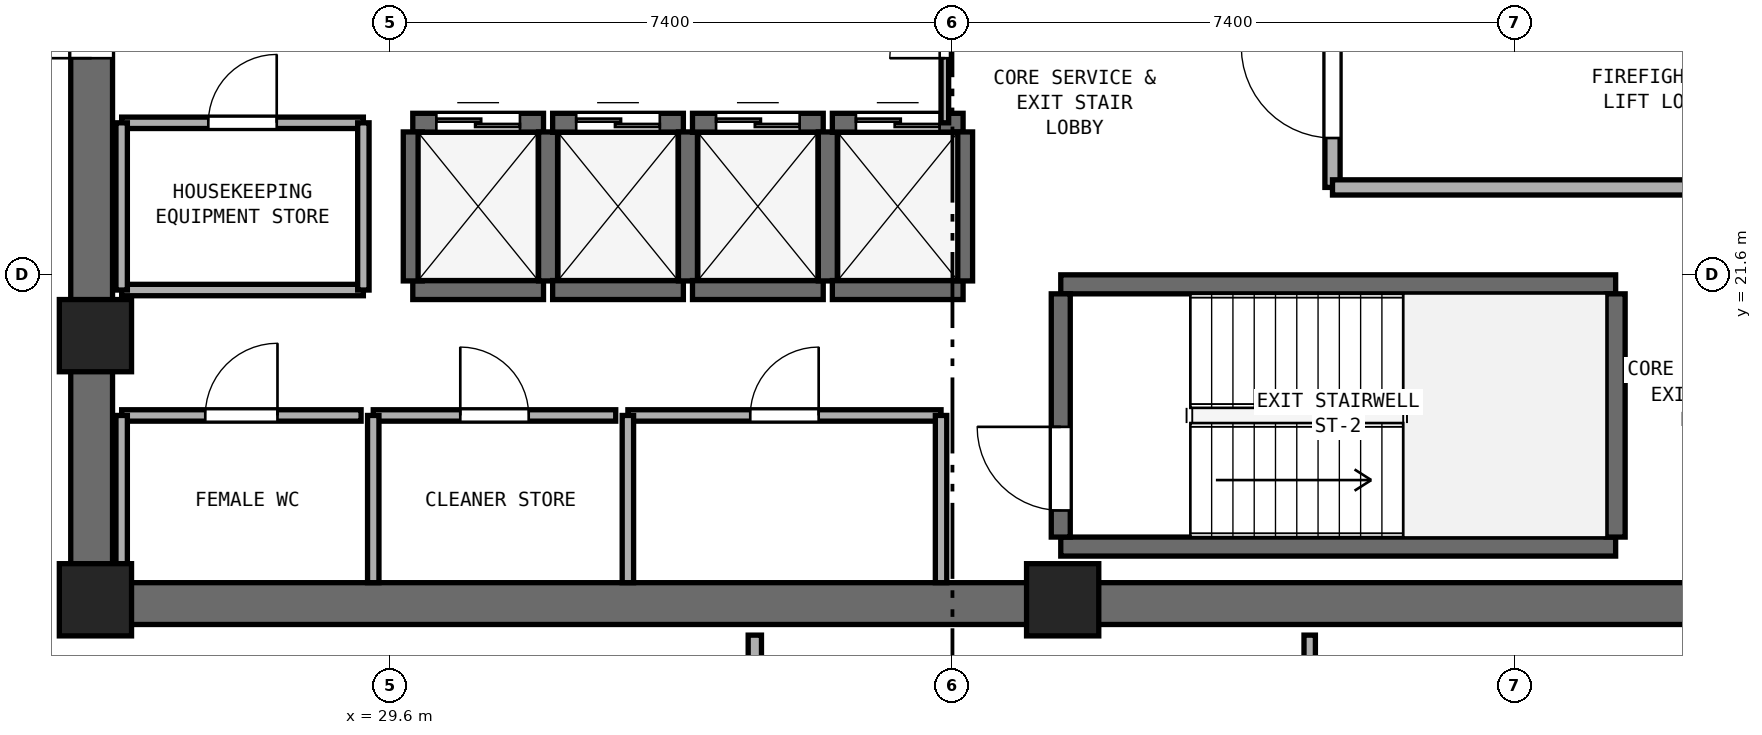
"""IFC4 building model, lengths in metres.
Left out: names, types, materials, properties, quantities, classifications, styles, units other than length and angle.
Written with IfcOpenShell. Run it as: python <this file> out.ifc"""

import sys

from ifc_helpers import new_model, si_unit, direction, frame, frame_2d, origin, origin_2d, place, context, subcontext, project, spatial, rectangle, extrude, element, fill, save


model = new_model("IFC4")
c1 = context("Model", 3, precision=1e-05, world=origin(), true_north=direction((0.0, 1.0)))
c2 = subcontext(c1, "Body", "Model", "MODEL_VIEW")
j1 = project(units=[si_unit("LENGTHUNIT", "METRE"), si_unit("PLANEANGLEUNIT", "RADIAN")], contexts=[c1])
p1 = place(None, origin())
s1 = spatial("IfcSite", under=j1, at=p1, CompositionType="ELEMENT")
p2 = place(p1, origin())
s2 = spatial("IfcBuilding", under=s1, at=p2, CompositionType="ELEMENT")
p3 = place(p2, frame((0.0, 0.0, 147.8)))
s3 = spatial("IfcBuildingStorey", under=s2, at=p3, CompositionType="ELEMENT", Elevation=147.8)
p4 = place(p3, frame((25.4, 17.275, 0.0), z_axis=(0.0, 0.0, 1.0), x_axis=(1.0, 0.0, 0.0)))
e1 = element("IfcWall", 1, at=p4, inside=s3, PredefinedType="SHEAR", context=c2, shape_type="SweptSolid", body=[
    extrude(rectangle(XDim=23.2, YDim=0.55, at=frame_2d((11.6, 0.0))), origin(), (0.0, 0.0, 1.0), 3.54),
])
p5 = place(p3, frame((25.675, 17.55, 0.0), z_axis=(0.0, 0.0, 1.0), x_axis=(0.0, 1.0, 0.0)))
e2 = element("IfcWall", 2, at=p5, inside=s3, PredefinedType="SHEAR", context=c2, shape_type="SweptSolid", body=[
    extrude(rectangle(XDim=15.3, YDim=0.55, at=frame_2d((7.65, 0.0))), origin(), (0.0, 0.0, 1.0), 3.54),
])
p6 = place(p5, frame((6.9, 0.0, 0.0)))
e3 = element("IfcOpeningElement", 3, at=p6, cuts=e2, PredefinedType="OPENING", context=c2, shape_type="SweptSolid", body=[
    extrude(rectangle(XDim=1.5, YDim=2.15, at=frame_2d((0.75, 1.075))), frame((0.0, 0.285, 0.0), z_axis=(0.0, -1.0, 0.0), x_axis=(1.0, 0.0, 0.0)), (0.0, 0.0, 1.0), 0.57),
])
for number, where, z_axis, x_axis in (
    (4, (25.725, 17.325, 0.0), (0.0, 0.0, 1.0), (1.0, 0.0, 0.0)),
    (5, (38.45, 17.325, 0.0), (0.0, 0.0, 1.0), (1.0, 0.0, 0.0)),
    (6, (25.725, 20.8, 0.0), (0.0, 0.0, 1.0), (1.0, 0.0, 0.0)),
):
    element("IfcColumn", number, at=place(p3, frame(where, z_axis=z_axis, x_axis=x_axis)), inside=s3, PredefinedType="PILASTER", context=c2, shape_type="SweptSolid", body=[
        extrude(rectangle(XDim=0.95, YDim=0.95, at=origin_2d()), origin(), (0.0, 0.0, 1.0), 3.8),
    ])
for number, where, z_axis, x_axis in (
    (7, (38.425, 18.025, 0.0), (0.0, 0.0, 1.0), (1.0, 0.0, 0.0)),
    (8, (38.425, 21.475, 0.0), (0.0, 0.0, 1.0), (1.0, 0.0, 0.0)),
):
    element("IfcWall", number, at=place(p3, frame(where, z_axis=z_axis, x_axis=x_axis)), inside=s3, PredefinedType="SHEAR", context=c2, shape_type="SweptSolid", body=[
        extrude(rectangle(XDim=7.3, YDim=0.25, at=frame_2d((3.65, 0.0))), origin(), (0.0, 0.0, 1.0), 3.54),
    ])
p7 = place(p3, frame((38.425, 18.15, 0.0), z_axis=(0.0, 0.0, 1.0), x_axis=(0.0, 1.0, 0.0)))
e9 = element("IfcWall", 9, at=p7, inside=s3, PredefinedType="SHEAR", context=c2, shape_type="SweptSolid", body=[
    extrude(rectangle(XDim=3.2, YDim=0.25, at=frame_2d((1.6, 0.0))), origin(), (0.0, 0.0, 1.0), 3.54),
])
p8 = place(p7, frame((0.35, 0.0, 0.0)))
e10 = element("IfcOpeningElement", 10, at=p8, cuts=e9, PredefinedType="OPENING", context=c2, shape_type="SweptSolid", body=[
    extrude(rectangle(XDim=1.1, YDim=2.15, at=frame_2d((0.55, 1.075))), frame((0.0, 0.135, 0.0), z_axis=(0.0, -1.0, 0.0), x_axis=(1.0, 0.0, 0.0)), (0.0, 0.0, 1.0), 0.27),
])
p9 = place(p3, frame((45.725, 18.15, 0.0), z_axis=(0.0, 0.0, 1.0), x_axis=(0.0, 1.0, 0.0)))
e11 = element("IfcWall", 11, at=p9, inside=s3, PredefinedType="SHEAR", context=c2, shape_type="SweptSolid", body=[
    extrude(rectangle(XDim=3.2, YDim=0.25, at=frame_2d((1.6, 0.0))), origin(), (0.0, 0.0, 1.0), 3.54),
])
p10 = place(p3, frame((29.9, 21.4, 0.0), z_axis=(0.0, 0.0, 1.0), x_axis=(1.0, 0.0, 0.0)))
e12 = element("IfcWall", 12, at=p10, inside=s3, PredefinedType="SHEAR", context=c2, shape_type="SweptSolid", body=[
    extrude(rectangle(XDim=1.72, YDim=0.25, at=frame_2d((0.86, 0.0))), origin(), (0.0, 0.0, 1.0), 3.54),
])
p11 = place(p3, frame((29.9, 23.6, 0.0), z_axis=(0.0, 0.0, 1.0), x_axis=(1.0, 0.0, 0.0)))
e13 = element("IfcWall", 13, at=p11, inside=s3, PredefinedType="SHEAR", context=c2, shape_type="SweptSolid", body=[
    extrude(rectangle(XDim=1.72, YDim=0.25, at=frame_2d((0.86, 0.0))), origin(), (0.0, 0.0, 1.0), 3.54),
])
p12 = place(p11, frame((0.31, 0.0, 0.0)))
e14 = element("IfcOpeningElement", 14, at=p12, cuts=e13, PredefinedType="OPENING", context=c2, shape_type="SweptSolid", body=[
    extrude(rectangle(XDim=1.1, YDim=2.15, at=frame_2d((0.55, 1.075))), frame((0.0, 0.135, 0.0), z_axis=(0.0, -1.0, 0.0), x_axis=(1.0, 0.0, 0.0)), (0.0, 0.0, 1.0), 0.27),
])
for number, where, z_axis, x_axis in (
    (15, (29.9, 21.52, 0.0), (0.0, 0.0, 1.0), (0.0, 1.0, 0.0)),
    (16, (31.68, 21.52, 0.0), (0.0, 0.0, 1.0), (0.0, 1.0, 0.0)),
):
    element("IfcWall", number, at=place(p3, frame(where, z_axis=z_axis, x_axis=x_axis)), inside=s3, PredefinedType="SHEAR", context=c2, shape_type="SweptSolid", body=[
        extrude(rectangle(XDim=1.96, YDim=0.25, at=frame_2d((0.98, 0.0))), origin(), (0.0, 0.0, 1.0), 3.54),
    ])
p13 = place(p3, frame((31.74, 21.4, 0.0), z_axis=(0.0, 0.0, 1.0), x_axis=(1.0, 0.0, 0.0)))
e17 = element("IfcWall", 17, at=p13, inside=s3, PredefinedType="SHEAR", context=c2, shape_type="SweptSolid", body=[
    extrude(rectangle(XDim=1.72, YDim=0.25, at=frame_2d((0.86, 0.0))), origin(), (0.0, 0.0, 1.0), 3.54),
])
p14 = place(p3, frame((31.74, 23.6, 0.0), z_axis=(0.0, 0.0, 1.0), x_axis=(1.0, 0.0, 0.0)))
e18 = element("IfcWall", 18, at=p14, inside=s3, PredefinedType="SHEAR", context=c2, shape_type="SweptSolid", body=[
    extrude(rectangle(XDim=1.72, YDim=0.25, at=frame_2d((0.86, 0.0))), origin(), (0.0, 0.0, 1.0), 3.54),
])
p15 = place(p14, frame((0.31, 0.0, 0.0)))
e19 = element("IfcOpeningElement", 19, at=p15, cuts=e18, PredefinedType="OPENING", context=c2, shape_type="SweptSolid", body=[
    extrude(rectangle(XDim=1.1, YDim=2.15, at=frame_2d((0.55, 1.075))), frame((0.0, 0.135, 0.0), z_axis=(0.0, -1.0, 0.0), x_axis=(1.0, 0.0, 0.0)), (0.0, 0.0, 1.0), 0.27),
])
p16 = place(p3, frame((33.52, 21.52, 0.0), z_axis=(0.0, 0.0, 1.0), x_axis=(0.0, 1.0, 0.0)))
e20 = element("IfcWall", 20, at=p16, inside=s3, PredefinedType="SHEAR", context=c2, shape_type="SweptSolid", body=[
    extrude(rectangle(XDim=1.96, YDim=0.25, at=frame_2d((0.98, 0.0))), origin(), (0.0, 0.0, 1.0), 3.54),
])
p17 = place(p3, frame((33.58, 21.4, 0.0), z_axis=(0.0, 0.0, 1.0), x_axis=(1.0, 0.0, 0.0)))
e21 = element("IfcWall", 21, at=p17, inside=s3, PredefinedType="SHEAR", context=c2, shape_type="SweptSolid", body=[
    extrude(rectangle(XDim=1.72, YDim=0.25, at=frame_2d((0.86, 0.0))), origin(), (0.0, 0.0, 1.0), 3.54),
])
p18 = place(p3, frame((33.58, 23.6, 0.0), z_axis=(0.0, 0.0, 1.0), x_axis=(1.0, 0.0, 0.0)))
e22 = element("IfcWall", 22, at=p18, inside=s3, PredefinedType="SHEAR", context=c2, shape_type="SweptSolid", body=[
    extrude(rectangle(XDim=1.72, YDim=0.25, at=frame_2d((0.86, 0.0))), origin(), (0.0, 0.0, 1.0), 3.54),
])
p19 = place(p18, frame((0.31, 0.0, 0.0)))
e23 = element("IfcOpeningElement", 23, at=p19, cuts=e22, PredefinedType="OPENING", context=c2, shape_type="SweptSolid", body=[
    extrude(rectangle(XDim=1.1, YDim=2.15, at=frame_2d((0.55, 1.075))), frame((0.0, 0.135, 0.0), z_axis=(0.0, -1.0, 0.0), x_axis=(1.0, 0.0, 0.0)), (0.0, 0.0, 1.0), 0.27),
])
p20 = place(p3, frame((35.36, 21.52, 0.0), z_axis=(0.0, 0.0, 1.0), x_axis=(0.0, 1.0, 0.0)))
e24 = element("IfcWall", 24, at=p20, inside=s3, PredefinedType="SHEAR", context=c2, shape_type="SweptSolid", body=[
    extrude(rectangle(XDim=1.96, YDim=0.25, at=frame_2d((0.98, 0.0))), origin(), (0.0, 0.0, 1.0), 3.54),
])
p21 = place(p3, frame((35.42, 21.4, 0.0), z_axis=(0.0, 0.0, 1.0), x_axis=(1.0, 0.0, 0.0)))
e25 = element("IfcWall", 25, at=p21, inside=s3, PredefinedType="SHEAR", context=c2, shape_type="SweptSolid", body=[
    extrude(rectangle(XDim=1.72, YDim=0.25, at=frame_2d((0.86, 0.0))), origin(), (0.0, 0.0, 1.0), 3.54),
])
p22 = place(p3, frame((35.42, 23.6, 0.0), z_axis=(0.0, 0.0, 1.0), x_axis=(1.0, 0.0, 0.0)))
e26 = element("IfcWall", 26, at=p22, inside=s3, PredefinedType="SHEAR", context=c2, shape_type="SweptSolid", body=[
    extrude(rectangle(XDim=1.72, YDim=0.25, at=frame_2d((0.86, 0.0))), origin(), (0.0, 0.0, 1.0), 3.54),
])
p23 = place(p22, frame((0.31, 0.0, 0.0)))
e27 = element("IfcOpeningElement", 27, at=p23, cuts=e26, PredefinedType="OPENING", context=c2, shape_type="SweptSolid", body=[
    extrude(rectangle(XDim=1.1, YDim=2.15, at=frame_2d((0.55, 1.075))), frame((0.0, 0.135, 0.0), z_axis=(0.0, -1.0, 0.0), x_axis=(1.0, 0.0, 0.0)), (0.0, 0.0, 1.0), 0.27),
])
p24 = place(p3, frame((37.14, 21.52, 0.0), z_axis=(0.0, 0.0, 1.0), x_axis=(0.0, 1.0, 0.0)))
e28 = element("IfcWall", 28, at=p24, inside=s3, PredefinedType="SHEAR", context=c2, shape_type="SweptSolid", body=[
    extrude(rectangle(XDim=1.96, YDim=0.25, at=frame_2d((0.98, 0.0))), origin(), (0.0, 0.0, 1.0), 3.54),
])
p25 = place(p3, frame((42.0, 22.75, 0.0), z_axis=(0.0, 0.0, 1.0), x_axis=(0.0, 1.0, 0.0)))
e29 = element("IfcWall", 29, at=p25, inside=s3, PredefinedType="SOLIDWALL", context=c2, shape_type="SweptSolid", body=[
    extrude(rectangle(XDim=6.05, YDim=0.2, at=frame_2d((3.025, 0.0))), origin(), (0.0, 0.0, 1.0), 3.54),
])
p26 = place(p25, frame((0.65, 0.0, 0.0)))
e30 = element("IfcOpeningElement", 30, at=p26, cuts=e29, PredefinedType="OPENING", context=c2, shape_type="SweptSolid", body=[
    extrude(rectangle(XDim=1.2, YDim=2.15, at=frame_2d((0.6, 1.075))), frame((0.0, 0.11, 0.0), z_axis=(0.0, -1.0, 0.0), x_axis=(1.0, 0.0, 0.0)), (0.0, 0.0, 1.0), 0.22),
])
p27 = place(p3, frame((42.0, 22.75, 0.0), z_axis=(0.0, 0.0, 1.0), x_axis=(1.0, 0.0, 0.0)))
e31 = element("IfcWall", 31, at=p27, inside=s3, PredefinedType="SOLIDWALL", context=c2, shape_type="SweptSolid", body=[
    extrude(rectangle(XDim=6.05, YDim=0.2, at=frame_2d((3.025, 0.0))), origin(), (0.0, 0.0, 1.0), 3.54),
])
p28 = place(p3, frame((26.07, 19.75, 0.0), z_axis=(0.0, 0.0, 1.0), x_axis=(1.0, 0.0, 0.0)))
e32 = element("IfcWall", 32, at=p28, inside=s3, PredefinedType="PARTITIONING", context=c2, shape_type="SweptSolid", body=[
    extrude(rectangle(XDim=3.15, YDim=0.15, at=frame_2d((1.575, 0.0))), origin(), (0.0, 0.0, 1.0), 3.54),
])
p29 = place(p28, frame((1.1, 0.0, 0.0)))
e33 = element("IfcOpeningElement", 33, at=p29, cuts=e32, PredefinedType="OPENING", context=c2, shape_type="SweptSolid", body=[
    extrude(rectangle(XDim=0.95, YDim=2.1, at=frame_2d((0.475, 1.05))), frame((0.0, 0.085, 0.0), z_axis=(0.0, -1.0, 0.0), x_axis=(1.0, 0.0, 0.0)), (0.0, 0.0, 1.0), 0.17),
])
p30 = place(p3, frame((26.07, 17.55, 0.0), z_axis=(0.0, 0.0, 1.0), x_axis=(0.0, 1.0, 0.0)))
e34 = element("IfcWall", 34, at=p30, inside=s3, PredefinedType="PARTITIONING", context=c2, shape_type="SweptSolid", body=[
    extrude(rectangle(XDim=2.2, YDim=0.15, at=frame_2d((1.1, 0.0))), origin(), (0.0, 0.0, 1.0), 2.64),
])
p31 = place(p3, frame((29.38, 19.75, 0.0), z_axis=(0.0, 0.0, 1.0), x_axis=(1.0, 0.0, 0.0)))
e35 = element("IfcWall", 35, at=p31, inside=s3, PredefinedType="PARTITIONING", context=c2, shape_type="SweptSolid", body=[
    extrude(rectangle(XDim=3.19, YDim=0.15, at=frame_2d((1.595, 0.0))), origin(), (0.0, 0.0, 1.0), 3.54),
])
p32 = place(p31, frame((1.145, 0.0, 0.0)))
e36 = element("IfcOpeningElement", 36, at=p32, cuts=e35, PredefinedType="OPENING", context=c2, shape_type="SweptSolid", body=[
    extrude(rectangle(XDim=0.9, YDim=2.1, at=frame_2d((0.45, 1.05))), frame((0.0, 0.085, 0.0), z_axis=(0.0, -1.0, 0.0), x_axis=(1.0, 0.0, 0.0)), (0.0, 0.0, 1.0), 0.17),
])
p33 = place(p3, frame((29.38, 17.55, 0.0), z_axis=(0.0, 0.0, 1.0), x_axis=(0.0, 1.0, 0.0)))
e37 = element("IfcWall", 37, at=p33, inside=s3, PredefinedType="PARTITIONING", context=c2, shape_type="SweptSolid", body=[
    extrude(rectangle(XDim=2.2, YDim=0.15, at=frame_2d((1.1, 0.0))), origin(), (0.0, 0.0, 1.0), 3.54),
])
p34 = place(p3, frame((32.73, 19.75, 0.0), z_axis=(0.0, 0.0, 1.0), x_axis=(1.0, 0.0, 0.0)))
e38 = element("IfcWall", 38, at=p34, inside=s3, PredefinedType="PARTITIONING", context=c2, shape_type="SweptSolid", body=[
    extrude(rectangle(XDim=4.12, YDim=0.15, at=frame_2d((2.06, 0.0))), origin(), (0.0, 0.0, 1.0), 3.54),
])
p35 = place(p34, frame((1.61, 0.0, 0.0)))
e39 = element("IfcOpeningElement", 39, at=p35, cuts=e38, PredefinedType="OPENING", context=c2, shape_type="SweptSolid", body=[
    extrude(rectangle(XDim=0.9, YDim=2.1, at=frame_2d((0.45, 1.05))), frame((0.0, 0.085, 0.0), z_axis=(0.0, -1.0, 0.0), x_axis=(1.0, 0.0, 0.0)), (0.0, 0.0, 1.0), 0.17),
])
for number, where, z_axis, x_axis in (
    (40, (32.73, 17.55, 0.0), (0.0, 0.0, 1.0), (0.0, 1.0, 0.0)),
    (41, (36.85, 17.55, 0.0), (0.0, 0.0, 1.0), (0.0, 1.0, 0.0)),
):
    element("IfcWall", number, at=place(p3, frame(where, z_axis=z_axis, x_axis=x_axis)), inside=s3, PredefinedType="PARTITIONING", context=c2, shape_type="SweptSolid", body=[
        extrude(rectangle(XDim=2.2, YDim=0.15, at=frame_2d((1.1, 0.0))), origin(), (0.0, 0.0, 1.0), 3.54),
    ])
p36 = place(p3, frame((26.07, 21.4, 0.0), z_axis=(0.0, 0.0, 1.0), x_axis=(1.0, 0.0, 0.0)))
e42 = element("IfcWall", 42, at=p36, inside=s3, PredefinedType="PARTITIONING", context=c2, shape_type="SweptSolid", body=[
    extrude(rectangle(XDim=3.18, YDim=0.15, at=frame_2d((1.59, 0.0))), origin(), (0.0, 0.0, 1.0), 3.54),
])
p37 = place(p3, frame((26.07, 23.6, 0.0), z_axis=(0.0, 0.0, 1.0), x_axis=(1.0, 0.0, 0.0)))
e43 = element("IfcWall", 43, at=p37, inside=s3, PredefinedType="PARTITIONING", context=c2, shape_type="SweptSolid", body=[
    extrude(rectangle(XDim=3.18, YDim=0.15, at=frame_2d((1.59, 0.0))), origin(), (0.0, 0.0, 1.0), 3.54),
])
p38 = place(p37, frame((1.14, 0.0, 0.0)))
e44 = element("IfcOpeningElement", 44, at=p38, cuts=e43, PredefinedType="OPENING", context=c2, shape_type="SweptSolid", body=[
    extrude(rectangle(XDim=0.9, YDim=2.1, at=frame_2d((0.45, 1.05))), frame((0.0, 0.085, 0.0), z_axis=(0.0, -1.0, 0.0), x_axis=(1.0, 0.0, 0.0)), (0.0, 0.0, 1.0), 0.17),
])
p39 = place(p3, frame((26.07, 21.4, 0.0), z_axis=(0.0, 0.0, 1.0), x_axis=(0.0, 1.0, 0.0)))
e45 = element("IfcWall", 45, at=p39, inside=s3, PredefinedType="PARTITIONING", context=c2, shape_type="SweptSolid", body=[
    extrude(rectangle(XDim=2.2, YDim=0.15, at=frame_2d((1.1, 0.0))), origin(), (0.0, 0.0, 1.0), 2.64),
])
p40 = place(p3, frame((29.25, 21.4, 0.0), z_axis=(0.0, 0.0, 1.0), x_axis=(0.0, 1.0, 0.0)))
e46 = element("IfcWall", 46, at=p40, inside=s3, PredefinedType="PARTITIONING", context=c2, shape_type="SweptSolid", body=[
    extrude(rectangle(XDim=2.2, YDim=0.15, at=frame_2d((1.1, 0.0))), origin(), (0.0, 0.0, 1.0), 3.54),
])
p41 = place(p3, frame((36.9, 23.6, 0.0), z_axis=(0.0, 0.0, 1.0), x_axis=(0.0, 1.0, 0.0)))
e47 = element("IfcWall", 47, at=p41, inside=s3, PredefinedType="PARTITIONING", context=c2, shape_type="SweptSolid", body=[
    extrude(rectangle(XDim=3.2, YDim=0.1, at=frame_2d((1.6, 0.0))), origin(), (0.0, 0.0, 1.0), 3.54),
])
p42 = place(p41, frame((0.85, 0.0, 0.0)))
e48 = element("IfcOpeningElement", 48, at=p42, cuts=e47, PredefinedType="OPENING", context=c2, shape_type="SweptSolid", body=[
    extrude(rectangle(XDim=1.45, YDim=2.12, at=frame_2d((0.725, 1.06))), frame((0.0, 0.06, 0.0), z_axis=(0.0, -1.0, 0.0), x_axis=(1.0, 0.0, 0.0)), (0.0, 0.0, 1.0), 0.12),
])
p43 = place(p3, frame((41.7, 2.621, 0.0), z_axis=(0.0, 0.0, 1.0), x_axis=(0.0, 1.0, 0.0)))
e49 = element("IfcWall", 49, at=p43, inside=s3, PredefinedType="PARTITIONING", context=c2, shape_type="SweptSolid", body=[
    extrude(rectangle(XDim=14.239, YDim=0.15, at=frame_2d((7.119, 0.0))), origin(), (0.0, 0.0, 1.0), 3.54),
])
p44 = place(p3, frame((34.4, 13.35, 0.0), z_axis=(0.0, 0.0, 1.0), x_axis=(0.0, 1.0, 0.0)))
e50 = element("IfcWall", 50, at=p44, inside=s3, PredefinedType="PARTITIONING", context=c2, shape_type="SweptSolid", body=[
    extrude(rectangle(XDim=3.51, YDim=0.175, at=frame_2d((1.755, 0.0))), origin(), (0.0, 0.0, 1.0), 3.54),
])
p45 = place(p8, origin())
e51 = element("IfcDoor", 51, at=p45, inside=s3, OperationType="SINGLE_SWING_RIGHT", PredefinedType="DOOR", context=c2, shape_type="SweptSolid", body=[
    extrude(rectangle(XDim=1.1, YDim=2.15, at=frame_2d((0.55, 1.075))), frame((0.0, 0.025, 0.0), z_axis=(0.0, -1.0, 0.0), x_axis=(1.0, 0.0, 0.0)), (0.0, 0.0, 1.0), 0.05),
])
fill(e10, e51)
p46 = place(p12, origin())
e52 = element("IfcDoor", 52, at=p46, inside=s3, OperationType="DOUBLE_DOOR_SLIDING", PredefinedType="DOOR", context=c2, shape_type="SweptSolid", body=[
    extrude(rectangle(XDim=1.1, YDim=2.15, at=frame_2d((0.55, 1.075))), frame((0.0, 0.025, 0.0), z_axis=(0.0, -1.0, 0.0), x_axis=(1.0, 0.0, 0.0)), (0.0, 0.0, 1.0), 0.05),
])
fill(e14, e52)
p47 = place(p15, origin())
e53 = element("IfcDoor", 53, at=p47, inside=s3, OperationType="DOUBLE_DOOR_SLIDING", PredefinedType="DOOR", context=c2, shape_type="SweptSolid", body=[
    extrude(rectangle(XDim=1.1, YDim=2.15, at=frame_2d((0.55, 1.075))), frame((0.0, 0.025, 0.0), z_axis=(0.0, -1.0, 0.0), x_axis=(1.0, 0.0, 0.0)), (0.0, 0.0, 1.0), 0.05),
])
fill(e19, e53)
p48 = place(p19, origin())
e54 = element("IfcDoor", 54, at=p48, inside=s3, OperationType="DOUBLE_DOOR_SLIDING", PredefinedType="DOOR", context=c2, shape_type="SweptSolid", body=[
    extrude(rectangle(XDim=1.1, YDim=2.15, at=frame_2d((0.55, 1.075))), frame((0.0, 0.025, 0.0), z_axis=(0.0, -1.0, 0.0), x_axis=(1.0, 0.0, 0.0)), (0.0, 0.0, 1.0), 0.05),
])
fill(e23, e54)
p49 = place(p23, origin())
e55 = element("IfcDoor", 55, at=p49, inside=s3, OperationType="DOUBLE_DOOR_SLIDING", PredefinedType="DOOR", context=c2, shape_type="SweptSolid", body=[
    extrude(rectangle(XDim=1.1, YDim=2.15, at=frame_2d((0.55, 1.075))), frame((0.0, 0.025, 0.0), z_axis=(0.0, -1.0, 0.0), x_axis=(1.0, 0.0, 0.0)), (0.0, 0.0, 1.0), 0.05),
])
fill(e27, e55)
p50 = place(p26, origin())
e56 = element("IfcDoor", 56, at=p50, inside=s3, OperationType="SINGLE_SWING_RIGHT", PredefinedType="DOOR", context=c2, shape_type="SweptSolid", body=[
    extrude(rectangle(XDim=1.2, YDim=2.15, at=frame_2d((0.6, 1.075))), frame((0.0, 0.025, 0.0), z_axis=(0.0, -1.0, 0.0), x_axis=(1.0, 0.0, 0.0)), (0.0, 0.0, 1.0), 0.05),
])
fill(e30, e56)
p51 = place(p6, origin())
e57 = element("IfcDoor", 57, at=p51, inside=s3, OperationType="DOUBLE_DOOR_SINGLE_SWING", PredefinedType="DOOR", context=c2, shape_type="SweptSolid", body=[
    extrude(rectangle(XDim=1.5, YDim=2.15, at=frame_2d((0.75, 1.075))), frame((0.0, 0.025, 0.0), z_axis=(0.0, -1.0, 0.0), x_axis=(1.0, 0.0, 0.0)), (0.0, 0.0, 1.0), 0.05),
])
fill(e3, e57)
p52 = place(p29, origin())
e58 = element("IfcDoor", 58, at=p52, inside=s3, OperationType="SINGLE_SWING_RIGHT", PredefinedType="DOOR", context=c2, shape_type="SweptSolid", body=[
    extrude(rectangle(XDim=0.95, YDim=2.1, at=frame_2d((0.475, 1.05))), frame((0.0, 0.025, 0.0), z_axis=(0.0, -1.0, 0.0), x_axis=(1.0, 0.0, 0.0)), (0.0, 0.0, 1.0), 0.05),
])
fill(e33, e58)
p53 = place(p32, origin())
e59 = element("IfcDoor", 59, at=p53, inside=s3, OperationType="SINGLE_SWING_LEFT", PredefinedType="DOOR", context=c2, shape_type="SweptSolid", body=[
    extrude(rectangle(XDim=0.9, YDim=2.1, at=frame_2d((0.45, 1.05))), frame((0.0, 0.025, 0.0), z_axis=(0.0, -1.0, 0.0), x_axis=(1.0, 0.0, 0.0)), (0.0, 0.0, 1.0), 0.05),
])
fill(e36, e59)
p54 = place(p35, origin())
e60 = element("IfcDoor", 60, at=p54, inside=s3, OperationType="SINGLE_SWING_RIGHT", PredefinedType="DOOR", context=c2, shape_type="SweptSolid", body=[
    extrude(rectangle(XDim=0.9, YDim=2.1, at=frame_2d((0.45, 1.05))), frame((0.0, 0.025, 0.0), z_axis=(0.0, -1.0, 0.0), x_axis=(1.0, 0.0, 0.0)), (0.0, 0.0, 1.0), 0.05),
])
fill(e39, e60)
p55 = place(p38, origin())
e61 = element("IfcDoor", 61, at=p55, inside=s3, OperationType="SINGLE_SWING_RIGHT", PredefinedType="DOOR", context=c2, shape_type="SweptSolid", body=[
    extrude(rectangle(XDim=0.9, YDim=2.1, at=frame_2d((0.45, 1.05))), frame((0.0, 0.025, 0.0), z_axis=(0.0, -1.0, 0.0), x_axis=(1.0, 0.0, 0.0)), (0.0, 0.0, 1.0), 0.05),
])
fill(e44, e61)
p56 = place(p42, origin())
e62 = element("IfcDoor", 62, at=p56, inside=s3, OperationType="DOUBLE_DOOR_SINGLE_SWING", PredefinedType="DOOR", context=c2, shape_type="SweptSolid", body=[
    extrude(rectangle(XDim=1.45, YDim=2.12, at=frame_2d((0.725, 1.06))), frame((0.0, 0.025, 0.0), z_axis=(0.0, -1.0, 0.0), x_axis=(1.0, 0.0, 0.0)), (0.0, 0.0, 1.0), 0.05),
])
fill(e48, e62)
save(model, sys.argv[1])
